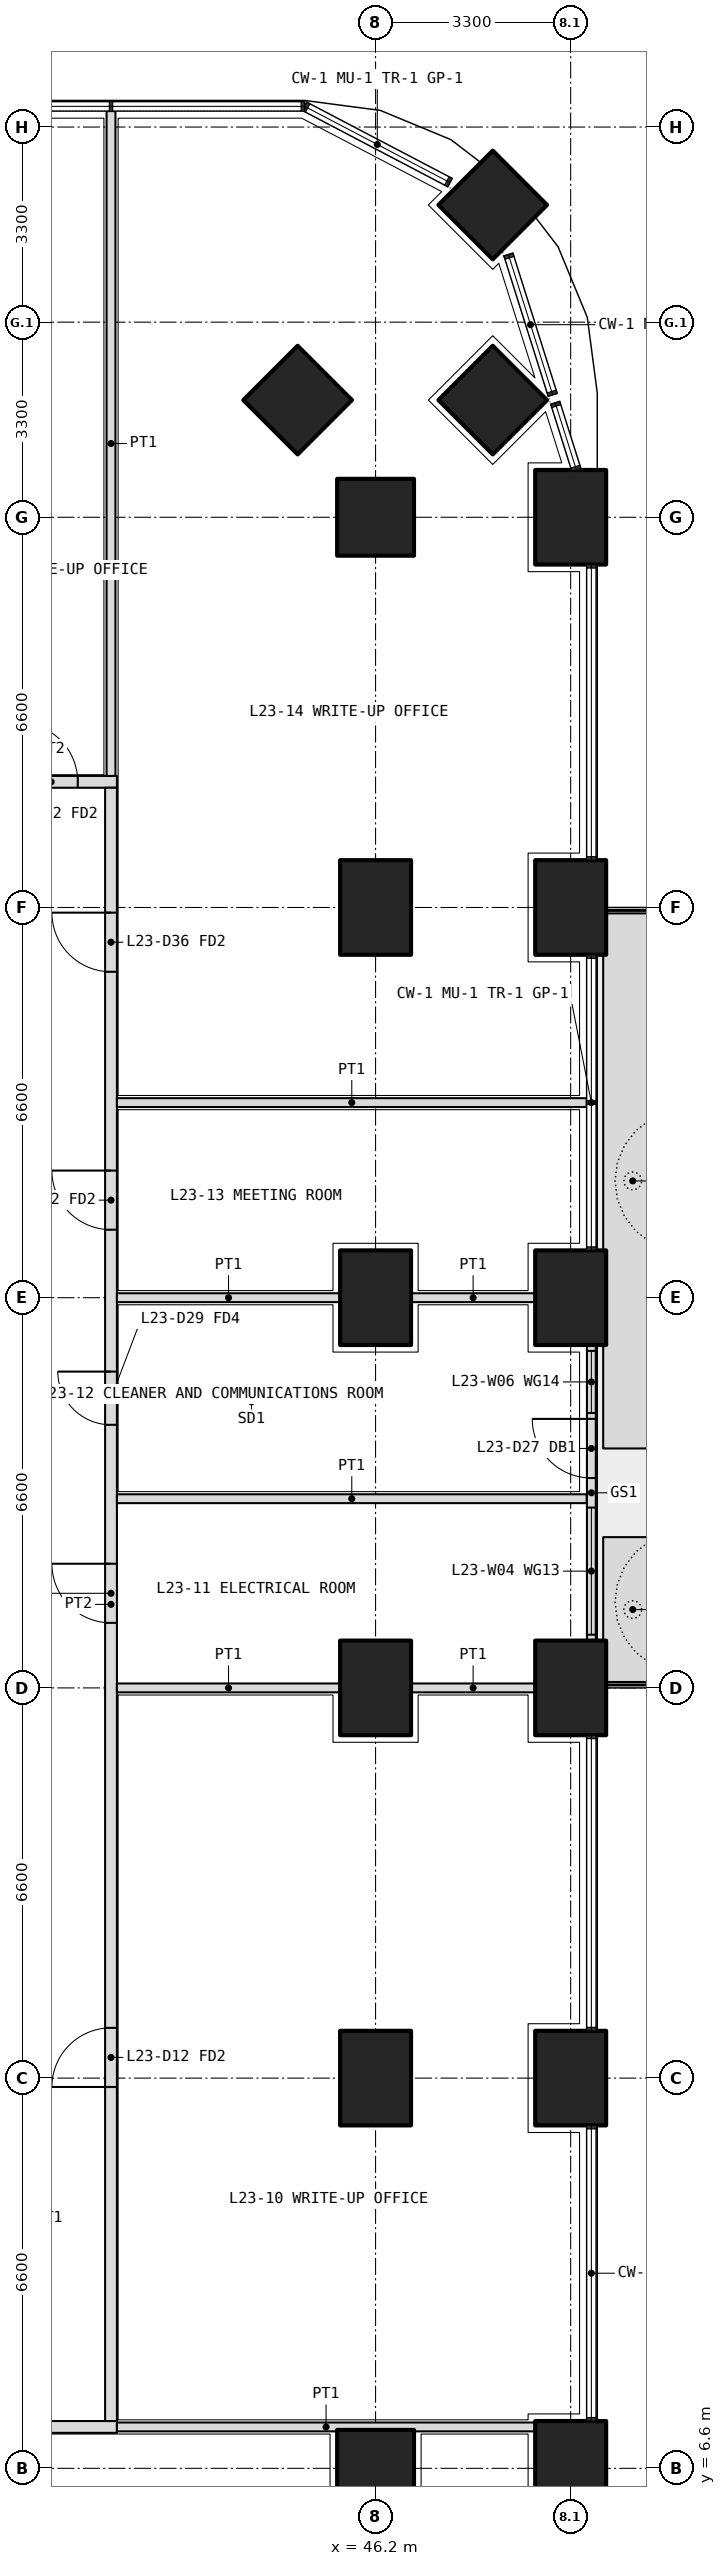
"""IFC4 building model, lengths in metres.
Left out: names, types, materials, properties, quantities, classifications, styles, units other than length and angle.
Written with IfcOpenShell. Run it as: python <this file> out.ifc"""

import sys

from ifc_helpers import new_model, si_unit, direction, frame, frame_2d, origin, origin_2d, place, context, subcontext, project, spatial, polyline, rectangle, outline, extrude, element, fill, save


model = new_model("IFC4")
c1 = context("Model", 3, precision=1e-05, world=origin(), true_north=direction((0.0, 1.0)))
c2 = subcontext(c1, "Body", "Model", "MODEL_VIEW")
j1 = project(units=[si_unit("LENGTHUNIT", "METRE"), si_unit("PLANEANGLEUNIT", "RADIAN")], contexts=[c1])
p1 = place(None, origin())
s1 = spatial("IfcSite", under=j1, at=p1, CompositionType="ELEMENT")
p2 = place(p1, origin())
s2 = spatial("IfcBuilding", under=s1, at=p2, CompositionType="ELEMENT")
p3 = place(p2, frame((0.0, 0.0, 103.2)))
s3 = spatial("IfcBuildingStorey", under=s2, at=p3, CompositionType="ELEMENT", Elevation=103.2)
p4 = place(p3, frame((48.182, 44.882, 0.0), z_axis=(0.0, 0.0, 1.0), x_axis=(0.707106781187, 0.707106781187, 0.0)))
e1 = element("IfcColumn", 1, at=p4, inside=s3, PredefinedType="COLUMN", context=c2, shape_type="SweptSolid", body=[
    extrude(rectangle(XDim=1.3, YDim=1.3, at=origin_2d()), origin(), (0.0, 0.0, 1.0), 4.2),
])
for number, where, z_axis, x_axis in (
    (2, (49.5, 6.6, 0.0), (0.0, 0.0, 1.0), (0.0, 1.0, 0.0)),
    (3, (49.5, 13.2, 0.0), (0.0, 0.0, 1.0), (0.0, 1.0, 0.0)),
    (4, (49.5, 19.8, 0.0), (0.0, 0.0, 1.0), (0.0, 1.0, 0.0)),
    (5, (49.5, 26.4, 0.0), (0.0, 0.0, 1.0), (0.0, 1.0, 0.0)),
    (6, (49.5, 33.0, 0.0), (0.0, 0.0, 1.0), (0.0, 1.0, 0.0)),
    (7, (49.5, 39.6, 0.0), (0.0, 0.0, 1.0), (0.0, 1.0, 0.0)),
):
    element("IfcColumn", number, at=place(p3, frame(where, z_axis=z_axis, x_axis=x_axis)), inside=s3, PredefinedType="COLUMN", context=c2, shape_type="SweptSolid", body=[
        extrude(rectangle(XDim=1.6, YDim=1.2, at=origin_2d()), origin(), (0.0, 0.0, 1.0), 4.2),
    ])
for number, where, z_axis, x_axis in (
    (8, (46.2, 6.6, 0.0), (0.0, 0.0, 1.0), (1.0, 0.0, 0.0)),
    (9, (46.2, 39.6, 0.0), (0.0, 0.0, 1.0), (1.0, 0.0, 0.0)),
    (10, (48.182, 41.582, 0.0), (0.0, 0.0, 1.0), (0.707, 0.707, 0.0)),
    (11, (44.882, 41.582, 0.0), (0.0, 0.0, 1.0), (0.707, 0.707, 0.0)),
):
    element("IfcColumn", number, at=place(p3, frame(where, z_axis=z_axis, x_axis=x_axis)), inside=s3, PredefinedType="COLUMN", context=c2, shape_type="SweptSolid", body=[
        extrude(rectangle(XDim=1.3, YDim=1.3, at=origin_2d()), origin(), (0.0, 0.0, 1.0), 4.2),
    ])
for number, where, z_axis, x_axis in (
    (12, (46.2, 13.2, 0.0), (0.0, 0.0, 1.0), (0.0, 1.0, 0.0)),
    (13, (46.2, 19.8, 0.0), (0.0, 0.0, 1.0), (0.0, 1.0, 0.0)),
    (14, (46.2, 26.4, 0.0), (0.0, 0.0, 1.0), (0.0, 1.0, 0.0)),
    (15, (46.2, 33.0, 0.0), (0.0, 0.0, 1.0), (0.0, 1.0, 0.0)),
):
    element("IfcColumn", number, at=place(p3, frame(where, z_axis=z_axis, x_axis=x_axis)), inside=s3, PredefinedType="COLUMN", context=c2, shape_type="SweptSolid", body=[
        extrude(rectangle(XDim=1.6, YDim=1.2, at=origin_2d()), origin(), (0.0, 0.0, 1.0), 4.2),
    ])
p5 = place(p3, origin())
e16 = element("IfcWall", 16, at=p5, inside=s3, PredefinedType="USERDEFINED", context=c2, shape_type="SweptSolid", body=[
    extrude(outline(polyline([(50.05, 19.9), (51.05, 19.9), (51.05, 22.35), (50.05, 22.35), (50.05, 19.9)]), holes=[polyline([(50.2, 20.05), (50.9, 20.05), (50.9, 22.2), (50.2, 22.2), (50.2, 20.05)])]), origin(), (0.0, 0.0, 1.0), 1.05),
])
p6 = place(p3, origin())
e17 = element("IfcWall", 17, at=p6, inside=s3, PredefinedType="USERDEFINED", context=c2, shape_type="SweptSolid", body=[
    extrude(outline(polyline([(50.05, 23.85), (51.05, 23.85), (51.05, 32.9), (50.05, 32.9), (50.05, 23.85)]), holes=[polyline([(50.2, 24.0), (50.9, 24.0), (50.9, 32.75), (50.2, 32.75), (50.2, 24.0)])]), origin(), (0.0, 0.0, 1.0), 1.05),
])
p7 = place(p3, frame((49.85, 20.6, 0.0), z_axis=(0.0, 0.0, 1.0), x_axis=(0.0, 1.0, 0.0)))
e18 = element("IfcWall", 18, at=p7, inside=s3, PredefinedType="SOLIDWALL", context=c2, shape_type="SweptSolid", body=[
    extrude(rectangle(XDim=5.0, YDim=0.15, at=frame_2d((2.5, 0.0))), origin(), (0.0, 0.0, 1.0), 2.7),
])
p8 = place(p7, frame((2.75, 0.0, 0.0)))
e19 = element("IfcOpeningElement", 19, at=p8, cuts=e18, PredefinedType="OPENING", context=c2, shape_type="SweptSolid", body=[
    extrude(rectangle(XDim=1.0, YDim=2.4, at=frame_2d((0.5, 1.2))), frame((0.0, 0.085, 0.0), z_axis=(0.0, -1.0, 0.0), x_axis=(1.0, 0.0, 0.0)), (0.0, 0.0, 1.0), 0.17),
])
p9 = place(p7, frame((0.1, 0.0, 0.1)))
e20 = element("IfcOpeningElement", 20, at=p9, cuts=e18, PredefinedType="OPENING", context=c2, shape_type="SweptSolid", body=[
    extrude(rectangle(XDim=2.15, YDim=2.3, at=frame_2d((1.075, 1.15))), frame((0.0, 0.085, 0.0), z_axis=(0.0, -1.0, 0.0), x_axis=(1.0, 0.0, 0.0)), (0.0, 0.0, 1.0), 0.17),
])
p10 = place(p7, frame((3.85, 0.0, 0.1)))
e21 = element("IfcOpeningElement", 21, at=p10, cuts=e18, PredefinedType="OPENING", context=c2, shape_type="SweptSolid", body=[
    extrude(rectangle(XDim=1.05, YDim=2.3, at=frame_2d((0.525, 1.15))), frame((0.0, 0.085, 0.0), z_axis=(0.0, -1.0, 0.0), x_axis=(1.0, 0.0, 0.0)), (0.0, 0.0, 1.0), 0.17),
])
p11 = place(p3, frame((10.975, 7.3, 0.0), z_axis=(0.0, 0.0, 1.0), x_axis=(1.0, 0.0, 0.0)))
e22 = element("IfcWall", 22, at=p11, inside=s3, PredefinedType="PARTITIONING", context=c2, shape_type="SweptSolid", body=[
    extrude(rectangle(XDim=30.85, YDim=0.2, at=frame_2d((15.425, 0.0))), origin(), (0.0, 0.0, 1.0), 2.85),
])
p12 = place(p11, frame((0.562, 0.0, 0.0)))
e23 = element("IfcOpeningElement", 23, at=p12, cuts=e22, PredefinedType="OPENING", context=c2, shape_type="SweptSolid", body=[
    extrude(rectangle(XDim=1.2, YDim=2.1, at=frame_2d((0.6, 1.05))), frame((0.0, 0.11, 0.0), z_axis=(0.0, -1.0, 0.0), x_axis=(1.0, 0.0, 0.0)), (0.0, 0.0, 1.0), 0.22),
])
p13 = place(p11, frame((8.325, 0.0, 0.0)))
e24 = element("IfcOpeningElement", 24, at=p13, cuts=e22, PredefinedType="OPENING", context=c2, shape_type="SweptSolid", body=[
    extrude(rectangle(XDim=1.0, YDim=2.1, at=frame_2d((0.5, 1.05))), frame((0.0, 0.11, 0.0), z_axis=(0.0, -1.0, 0.0), x_axis=(1.0, 0.0, 0.0)), (0.0, 0.0, 1.0), 0.22),
])
p14 = place(p11, frame((16.475, 0.0, 0.0)))
e25 = element("IfcOpeningElement", 25, at=p14, cuts=e22, PredefinedType="OPENING", context=c2, shape_type="SweptSolid", body=[
    extrude(rectangle(XDim=1.2, YDim=2.1, at=frame_2d((0.6, 1.05))), frame((0.0, 0.11, 0.0), z_axis=(0.0, -1.0, 0.0), x_axis=(1.0, 0.0, 0.0)), (0.0, 0.0, 1.0), 0.22),
])
p15 = place(p11, frame((21.525, 0.0, 0.0)))
e26 = element("IfcOpeningElement", 26, at=p15, cuts=e22, PredefinedType="OPENING", context=c2, shape_type="SweptSolid", body=[
    extrude(rectangle(XDim=1.0, YDim=2.1, at=frame_2d((0.5, 1.05))), frame((0.0, 0.11, 0.0), z_axis=(0.0, -1.0, 0.0), x_axis=(1.0, 0.0, 0.0)), (0.0, 0.0, 1.0), 0.22),
])
p16 = place(p11, frame((27.538, 0.0, 0.0)))
e27 = element("IfcOpeningElement", 27, at=p16, cuts=e22, PredefinedType="OPENING", context=c2, shape_type="SweptSolid", body=[
    extrude(rectangle(XDim=1.0, YDim=2.1, at=frame_2d((0.5, 1.05))), frame((0.0, 0.11, 0.0), z_axis=(0.0, -1.0, 0.0), x_axis=(1.0, 0.0, 0.0)), (0.0, 0.0, 1.0), 0.22),
])
p17 = place(p3, frame((39.6, 35.125, 0.0), z_axis=(0.0, 0.0, 1.0), x_axis=(1.0, 0.0, 0.0)))
e28 = element("IfcWall", 28, at=p17, inside=s3, PredefinedType="PARTITIONING", context=c2, shape_type="SweptSolid", body=[
    extrude(rectangle(XDim=2.225, YDim=0.2, at=frame_2d((1.112, 0.0))), origin(), (0.0, 0.0, 1.0), 2.85),
])
p18 = place(p17, frame((0.562, 0.0, 0.0)))
e29 = element("IfcOpeningElement", 29, at=p18, cuts=e28, PredefinedType="OPENING", context=c2, shape_type="SweptSolid", body=[
    extrude(rectangle(XDim=1.0, YDim=2.1, at=frame_2d((0.5, 1.05))), frame((0.0, 0.11, 0.0), z_axis=(0.0, -1.0, 0.0), x_axis=(1.0, 0.0, 0.0)), (0.0, 0.0, 1.0), 0.22),
])
p19 = place(p3, frame((41.725, 7.4, 0.0), z_axis=(0.0, 0.0, 1.0), x_axis=(0.0, 1.0, 0.0)))
e30 = element("IfcWall", 30, at=p19, inside=s3, PredefinedType="PARTITIONING", context=c2, shape_type="SweptSolid", body=[
    extrude(rectangle(XDim=27.625, YDim=0.2, at=frame_2d((13.812, 0.0))), origin(), (0.0, 0.0, 1.0), 2.85),
])
p20 = place(p19, frame((5.65, 0.0, 0.0)))
e31 = element("IfcOpeningElement", 31, at=p20, cuts=e30, PredefinedType="OPENING", context=c2, shape_type="SweptSolid", body=[
    extrude(rectangle(XDim=1.0, YDim=2.1, at=frame_2d((0.5, 1.05))), frame((0.0, 0.11, 0.0), z_axis=(0.0, -1.0, 0.0), x_axis=(1.0, 0.0, 0.0)), (0.0, 0.0, 1.0), 0.22),
])
p21 = place(p19, frame((13.5, 0.0, 0.0)))
e32 = element("IfcOpeningElement", 32, at=p21, cuts=e30, PredefinedType="OPENING", context=c2, shape_type="SweptSolid", body=[
    extrude(rectangle(XDim=1.0, YDim=2.1, at=frame_2d((0.5, 1.05))), frame((0.0, 0.11, 0.0), z_axis=(0.0, -1.0, 0.0), x_axis=(1.0, 0.0, 0.0)), (0.0, 0.0, 1.0), 0.22),
])
p22 = place(p19, frame((16.85, 0.0, 0.0)))
e33 = element("IfcOpeningElement", 33, at=p22, cuts=e30, PredefinedType="OPENING", context=c2, shape_type="SweptSolid", body=[
    extrude(rectangle(XDim=0.9, YDim=2.1, at=frame_2d((0.45, 1.05))), frame((0.0, 0.11, 0.0), z_axis=(0.0, -1.0, 0.0), x_axis=(1.0, 0.0, 0.0)), (0.0, 0.0, 1.0), 0.22),
])
p23 = place(p19, frame((20.15, 0.0, 0.0)))
e34 = element("IfcOpeningElement", 34, at=p23, cuts=e30, PredefinedType="OPENING", context=c2, shape_type="SweptSolid", body=[
    extrude(rectangle(XDim=1.0, YDim=2.1, at=frame_2d((0.5, 1.05))), frame((0.0, 0.11, 0.0), z_axis=(0.0, -1.0, 0.0), x_axis=(1.0, 0.0, 0.0)), (0.0, 0.0, 1.0), 0.22),
])
p24 = place(p19, frame((24.512, 0.0, 0.0)))
e35 = element("IfcOpeningElement", 35, at=p24, cuts=e30, PredefinedType="OPENING", context=c2, shape_type="SweptSolid", body=[
    extrude(rectangle(XDim=1.0, YDim=2.1, at=frame_2d((0.5, 1.05))), frame((0.0, 0.11, 0.0), z_axis=(0.0, -1.0, 0.0), x_axis=(1.0, 0.0, 0.0)), (0.0, 0.0, 1.0), 0.22),
])
p25 = place(p3, frame((48.9, 7.3, 0.0), z_axis=(0.0, 0.0, 1.0), x_axis=(-1.0, 0.0, 0.0)))
e36 = element("IfcWall", 36, at=p25, inside=s3, PredefinedType="PARTITIONING", context=c2, shape_type="SweptSolid", body=[
    extrude(rectangle(XDim=7.075, YDim=0.15, at=frame_2d((3.538, 0.0))), origin(), (0.0, 0.0, 1.0), 2.85),
])
p26 = place(p3, frame((41.725, 46.47, 0.0), z_axis=(0.0, 0.0, 1.0), x_axis=(0.0, -1.0, 0.0)))
e37 = element("IfcWall", 37, at=p26, inside=s3, PredefinedType="PARTITIONING", context=c2, shape_type="SweptSolid", body=[
    extrude(rectangle(XDim=11.245, YDim=0.15, at=frame_2d((5.623, 0.0))), origin(), (0.0, 0.0, 1.0), 2.7),
])
p27 = place(p3, frame((49.77, 23.0, 0.0), z_axis=(0.0, 0.0, 1.0), x_axis=(-1.0, 0.0, 0.0)))
e38 = element("IfcWall", 38, at=p27, inside=s3, PredefinedType="PARTITIONING", context=c2, shape_type="SweptSolid", body=[
    extrude(rectangle(XDim=7.945, YDim=0.15, at=frame_2d((3.973, 0.0))), origin(), (0.0, 0.0, 1.0), 2.7),
])
p28 = place(p3, frame((48.9, 26.4, 0.0), z_axis=(0.0, 0.0, 1.0), x_axis=(-1.0, 0.0, 0.0)))
e39 = element("IfcWall", 39, at=p28, inside=s3, PredefinedType="PARTITIONING", context=c2, shape_type="SweptSolid", body=[
    extrude(rectangle(XDim=2.1, YDim=0.15, at=frame_2d((1.05, 0.0))), origin(), (0.0, 0.0, 1.0), 2.85),
])
p29 = place(p3, frame((45.6, 26.4, 0.0), z_axis=(0.0, 0.0, 1.0), x_axis=(-1.0, 0.0, 0.0)))
e40 = element("IfcWall", 40, at=p29, inside=s3, PredefinedType="PARTITIONING", context=c2, shape_type="SweptSolid", body=[
    extrude(rectangle(XDim=3.775, YDim=0.15, at=frame_2d((1.888, 0.0))), origin(), (0.0, 0.0, 1.0), 2.85),
])
p30 = place(p3, frame((48.9, 19.8, 0.0), z_axis=(0.0, 0.0, 1.0), x_axis=(-1.0, 0.0, 0.0)))
e41 = element("IfcWall", 41, at=p30, inside=s3, PredefinedType="PARTITIONING", context=c2, shape_type="SweptSolid", body=[
    extrude(rectangle(XDim=2.1, YDim=0.15, at=frame_2d((1.05, 0.0))), origin(), (0.0, 0.0, 1.0), 2.85),
])
p31 = place(p3, frame((45.6, 19.8, 0.0), z_axis=(0.0, 0.0, 1.0), x_axis=(-1.0, 0.0, 0.0)))
e42 = element("IfcWall", 42, at=p31, inside=s3, PredefinedType="PARTITIONING", context=c2, shape_type="SweptSolid", body=[
    extrude(rectangle(XDim=3.775, YDim=0.15, at=frame_2d((1.888, 0.0))), origin(), (0.0, 0.0, 1.0), 2.85),
])
p32 = place(p3, frame((49.77, 29.7, 0.0), z_axis=(0.0, 0.0, 1.0), x_axis=(-1.0, 0.0, 0.0)))
e43 = element("IfcWall", 43, at=p32, inside=s3, PredefinedType="PARTITIONING", context=c2, shape_type="SweptSolid", body=[
    extrude(rectangle(XDim=7.945, YDim=0.15, at=frame_2d((3.973, 0.0))), origin(), (0.0, 0.0, 1.0), 2.7),
])
p33 = place(p8, origin())
e44 = element("IfcDoor", 44, at=p33, inside=s3, OperationType="SINGLE_SWING_RIGHT", PredefinedType="DOOR", context=c2, shape_type="SweptSolid", body=[
    extrude(rectangle(XDim=1.0, YDim=2.4, at=frame_2d((0.5, 1.2))), frame((0.0, 0.025, 0.0), z_axis=(0.0, -1.0, 0.0), x_axis=(1.0, 0.0, 0.0)), (0.0, 0.0, 1.0), 0.05),
])
fill(e19, e44)
p34 = place(p9, origin())
e45 = element("IfcWindow", 45, at=p34, inside=s3, PartitioningType="SINGLE_PANEL", PredefinedType="WINDOW", context=c2, shape_type="SweptSolid", body=[
    extrude(rectangle(XDim=2.15, YDim=2.3, at=frame_2d((1.075, 1.15))), frame((0.0, 0.03, 0.0), z_axis=(0.0, -1.0, 0.0), x_axis=(1.0, 0.0, 0.0)), (0.0, 0.0, 1.0), 0.06),
])
fill(e20, e45)
p35 = place(p10, origin())
e46 = element("IfcWindow", 46, at=p35, inside=s3, PartitioningType="SINGLE_PANEL", PredefinedType="WINDOW", context=c2, shape_type="SweptSolid", body=[
    extrude(rectangle(XDim=1.05, YDim=2.3, at=frame_2d((0.525, 1.15))), frame((0.0, 0.03, 0.0), z_axis=(0.0, -1.0, 0.0), x_axis=(1.0, 0.0, 0.0)), (0.0, 0.0, 1.0), 0.06),
])
fill(e21, e46)
p36 = place(p20, origin())
e47 = element("IfcDoor", 47, at=p36, inside=s3, OperationType="SINGLE_SWING_LEFT", PredefinedType="DOOR", context=c2, shape_type="SweptSolid", body=[
    extrude(rectangle(XDim=1.0, YDim=2.1, at=frame_2d((0.5, 1.05))), frame((0.0, 0.025, 0.0), z_axis=(0.0, -1.0, 0.0), x_axis=(1.0, 0.0, 0.0)), (0.0, 0.0, 1.0), 0.05),
])
fill(e31, e47)
p37 = place(p21, origin())
e48 = element("IfcDoor", 48, at=p37, inside=s3, OperationType="SINGLE_SWING_RIGHT", PredefinedType="DOOR", context=c2, shape_type="SweptSolid", body=[
    extrude(rectangle(XDim=1.0, YDim=2.1, at=frame_2d((0.5, 1.05))), frame((0.0, 0.025, 0.0), z_axis=(0.0, -1.0, 0.0), x_axis=(1.0, 0.0, 0.0)), (0.0, 0.0, 1.0), 0.05),
])
fill(e32, e48)
p38 = place(p22, origin())
e49 = element("IfcDoor", 49, at=p38, inside=s3, OperationType="SINGLE_SWING_RIGHT", PredefinedType="DOOR", context=c2, shape_type="SweptSolid", body=[
    extrude(rectangle(XDim=0.9, YDim=2.1, at=frame_2d((0.45, 1.05))), frame((0.0, 0.025, 0.0), z_axis=(0.0, -1.0, 0.0), x_axis=(1.0, 0.0, 0.0)), (0.0, 0.0, 1.0), 0.05),
])
fill(e33, e49)
p39 = place(p23, origin())
e50 = element("IfcDoor", 50, at=p39, inside=s3, OperationType="SINGLE_SWING_RIGHT", PredefinedType="DOOR", context=c2, shape_type="SweptSolid", body=[
    extrude(rectangle(XDim=1.0, YDim=2.1, at=frame_2d((0.5, 1.05))), frame((0.0, 0.025, 0.0), z_axis=(0.0, -1.0, 0.0), x_axis=(1.0, 0.0, 0.0)), (0.0, 0.0, 1.0), 0.05),
])
fill(e34, e50)
p40 = place(p24, origin())
e51 = element("IfcDoor", 51, at=p40, inside=s3, OperationType="SINGLE_SWING_RIGHT", PredefinedType="DOOR", context=c2, shape_type="SweptSolid", body=[
    extrude(rectangle(XDim=1.0, YDim=2.1, at=frame_2d((0.5, 1.05))), frame((0.0, 0.025, 0.0), z_axis=(0.0, -1.0, 0.0), x_axis=(1.0, 0.0, 0.0)), (0.0, 0.0, 1.0), 0.05),
])
fill(e35, e51)
p41 = place(p18, origin())
e52 = element("IfcDoor", 52, at=p41, inside=s3, OperationType="SINGLE_SWING_LEFT", PredefinedType="DOOR", context=c2, shape_type="SweptSolid", body=[
    extrude(rectangle(XDim=1.0, YDim=2.1, at=frame_2d((0.5, 1.05))), frame((0.0, 0.025, 0.0), z_axis=(0.0, -1.0, 0.0), x_axis=(1.0, 0.0, 0.0)), (0.0, 0.0, 1.0), 0.05),
])
fill(e29, e52)
save(model, sys.argv[1])
